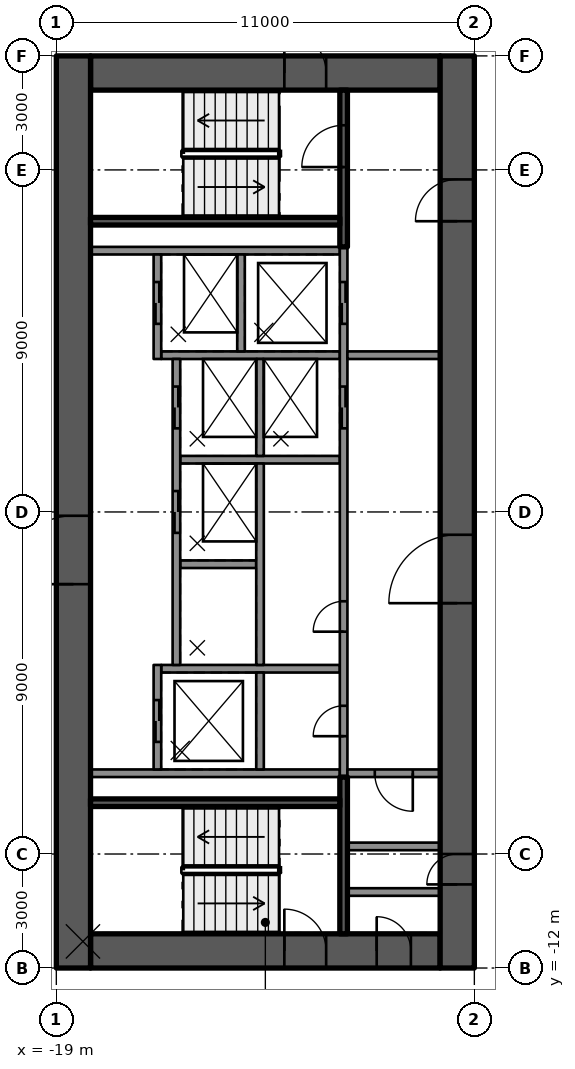
"""IFC4 building model, lengths in metres.
Left out: names, types, materials, properties, quantities, classifications, styles, units other than length and angle.
Written with IfcOpenShell. Run it as: python <this file> out.ifc"""

import sys

from ifc_helpers import new_model, si_unit, direction, frame, frame_2d, origin, place, context, subcontext, project, spatial, rectangle, extrude, element, fill, save


model = new_model("IFC4")
c1 = context("Model", 3, precision=1e-05, world=origin(), true_north=direction((0.0, 1.0)))
c2 = subcontext(c1, "Body", "Model", "MODEL_VIEW")
j1 = project(units=[si_unit("LENGTHUNIT", "METRE"), si_unit("PLANEANGLEUNIT", "RADIAN")], contexts=[c1])
p1 = place(None, origin())
s1 = spatial("IfcSite", under=j1, at=p1, CompositionType="ELEMENT")
p2 = place(p1, origin())
s2 = spatial("IfcBuilding", under=s1, at=p2, CompositionType="ELEMENT")
p3 = place(p2, frame((0.0, 0.0, 192.1)))
s3 = spatial("IfcBuildingStorey", under=s2, at=p3, CompositionType="ELEMENT", Elevation=192.1)
p4 = place(p3, frame((-18.1, 11.55, 0.0), z_axis=(0.0, 0.0, 1.0), x_axis=(1.0, 0.0, 0.0)))
e1 = element("IfcWall", 1, at=p4, inside=s3, PredefinedType="SHEAR", context=c2, shape_type="SweptSolid", body=[
    extrude(rectangle(XDim=9.2, YDim=0.9, at=frame_2d((4.6, 0.0))), origin(), (0.0, 0.0, 1.0), 3.5),
])
p5 = place(p4, frame((5.1, 0.0, 0.0)))
e2 = element("IfcOpeningElement", 2, at=p5, cuts=e1, PredefinedType="OPENING", context=c2, shape_type="SweptSolid", body=[
    extrude(rectangle(XDim=1.1, YDim=2.1, at=frame_2d((0.55, 1.05))), frame((0.0, 0.46, 0.0), z_axis=(0.0, -1.0, 0.0), x_axis=(1.0, 0.0, 0.0)), (0.0, 0.0, 1.0), 0.92),
])
p6 = place(p3, frame((-18.1, -11.55, 0.0), z_axis=(0.0, 0.0, 1.0), x_axis=(1.0, 0.0, 0.0)))
e3 = element("IfcWall", 3, at=p6, inside=s3, PredefinedType="SHEAR", context=c2, shape_type="SweptSolid", body=[
    extrude(rectangle(XDim=9.2, YDim=0.9, at=frame_2d((4.6, 0.0))), origin(), (0.0, 0.0, 1.0), 3.5),
])
p7 = place(p6, frame((5.1, 0.0, 0.0)))
e4 = element("IfcOpeningElement", 4, at=p7, cuts=e3, PredefinedType="OPENING", context=c2, shape_type="SweptSolid", body=[
    extrude(rectangle(XDim=1.1, YDim=2.1, at=frame_2d((0.55, 1.05))), frame((0.0, 0.46, 0.0), z_axis=(0.0, -1.0, 0.0), x_axis=(1.0, 0.0, 0.0)), (0.0, 0.0, 1.0), 0.92),
])
p8 = place(p6, frame((7.53, 0.0, 0.0)))
e5 = element("IfcOpeningElement", 5, at=p8, cuts=e3, PredefinedType="OPENING", context=c2, shape_type="SweptSolid", body=[
    extrude(rectangle(XDim=0.9, YDim=2.1, at=frame_2d((0.45, 1.05))), frame((0.0, 0.46, 0.0), z_axis=(0.0, -1.0, 0.0), x_axis=(1.0, 0.0, 0.0)), (0.0, 0.0, 1.0), 0.92),
])
p9 = place(p3, frame((-18.55, -12.0, 0.0), z_axis=(0.0, 0.0, 1.0), x_axis=(0.0, 1.0, 0.0)))
e6 = element("IfcWall", 6, at=p9, inside=s3, PredefinedType="SHEAR", context=c2, shape_type="SweptSolid", body=[
    extrude(rectangle(XDim=24.0, YDim=0.9, at=frame_2d((12.0, 0.0))), origin(), (0.0, 0.0, 1.0), 3.5),
])
p10 = place(p9, frame((10.1, 0.0, 0.0)))
e7 = element("IfcOpeningElement", 7, at=p10, cuts=e6, PredefinedType="OPENING", context=c2, shape_type="SweptSolid", body=[
    extrude(rectangle(XDim=1.8, YDim=2.1, at=frame_2d((0.9, 1.05))), frame((0.0, 0.46, 0.0), z_axis=(0.0, -1.0, 0.0), x_axis=(1.0, 0.0, 0.0)), (0.0, 0.0, 1.0), 0.92),
])
p11 = place(p3, frame((-8.45, -12.0, 0.0), z_axis=(0.0, 0.0, 1.0), x_axis=(0.0, 1.0, 0.0)))
e8 = element("IfcWall", 8, at=p11, inside=s3, PredefinedType="SHEAR", context=c2, shape_type="SweptSolid", body=[
    extrude(rectangle(XDim=24.0, YDim=0.9, at=frame_2d((12.0, 0.0))), origin(), (0.0, 0.0, 1.0), 3.5),
])
p12 = place(p11, frame((9.6, 0.0, 0.0)))
e9 = element("IfcOpeningElement", 9, at=p12, cuts=e8, PredefinedType="OPENING", context=c2, shape_type="SweptSolid", body=[
    extrude(rectangle(XDim=1.8, YDim=2.1, at=frame_2d((0.9, 1.05))), frame((0.0, 0.46, 0.0), z_axis=(0.0, -1.0, 0.0), x_axis=(1.0, 0.0, 0.0)), (0.0, 0.0, 1.0), 0.92),
])
p13 = place(p11, frame((19.65, 0.0, 0.0)))
e10 = element("IfcOpeningElement", 10, at=p13, cuts=e8, PredefinedType="OPENING", context=c2, shape_type="SweptSolid", body=[
    extrude(rectangle(XDim=1.1, YDim=2.1, at=frame_2d((0.55, 1.05))), frame((0.0, 0.46, 0.0), z_axis=(0.0, -1.0, 0.0), x_axis=(1.0, 0.0, 0.0)), (0.0, 0.0, 1.0), 0.92),
])
p14 = place(p11, frame((2.2, 0.0, 0.0)))
e11 = element("IfcOpeningElement", 11, at=p14, cuts=e8, PredefinedType="OPENING", context=c2, shape_type="SweptSolid", body=[
    extrude(rectangle(XDim=0.8, YDim=2.1, at=frame_2d((0.4, 1.05))), frame((0.0, 0.46, 0.0), z_axis=(0.0, -1.0, 0.0), x_axis=(1.0, 0.0, 0.0)), (0.0, 0.0, 1.0), 0.92),
])
for number, where, z_axis, x_axis in (
    (12, (-11.54, 6.875, 0.0), (0.0, 0.0, 1.0), (-1.0, 0.0, 0.0)),
    (13, (-11.54, -6.875, 0.0), (0.0, 0.0, 1.0), (-1.0, 0.0, 0.0)),
):
    element("IfcWall", number, at=place(p3, frame(where, z_axis=z_axis, x_axis=x_axis)), inside=s3, PredefinedType="SOLIDWALL", context=c2, shape_type="SweptSolid", body=[
        extrude(rectangle(XDim=6.56, YDim=0.2, at=frame_2d((3.28, 0.0))), origin(), (0.0, 0.0, 1.0), 3.08),
    ])
p15 = place(p3, frame((-11.54, -4.125, 0.0), z_axis=(0.0, 0.0, 1.0), x_axis=(-1.0, 0.0, 0.0)))
e14 = element("IfcWall", 14, at=p15, inside=s3, PredefinedType="SOLIDWALL", context=c2, shape_type="SweptSolid", body=[
    extrude(rectangle(XDim=4.7, YDim=0.2, at=frame_2d((2.35, 0.0))), origin(), (0.0, 0.0, 1.0), 3.08),
])
p16 = place(p3, frame((-13.74, -1.375, 0.0), z_axis=(0.0, 0.0, 1.0), x_axis=(-1.0, 0.0, 0.0)))
e15 = element("IfcWall", 15, at=p16, inside=s3, PredefinedType="SOLIDWALL", context=c2, shape_type="SweptSolid", body=[
    extrude(rectangle(XDim=2.0, YDim=0.2, at=frame_2d((1.0, 0.0))), origin(), (0.0, 0.0, 1.0), 3.08),
])
p17 = place(p3, frame((-11.54, 1.375, 0.0), z_axis=(0.0, 0.0, 1.0), x_axis=(-1.0, 0.0, 0.0)))
e16 = element("IfcWall", 16, at=p17, inside=s3, PredefinedType="SOLIDWALL", context=c2, shape_type="SweptSolid", body=[
    extrude(rectangle(XDim=4.2, YDim=0.2, at=frame_2d((2.1, 0.0))), origin(), (0.0, 0.0, 1.0), 3.08),
])
p18 = place(p3, frame((-11.54, 4.125, 0.0), z_axis=(0.0, 0.0, 1.0), x_axis=(-1.0, 0.0, 0.0)))
e17 = element("IfcWall", 17, at=p18, inside=s3, PredefinedType="SOLIDWALL", context=c2, shape_type="SweptSolid", body=[
    extrude(rectangle(XDim=4.7, YDim=0.2, at=frame_2d((2.35, 0.0))), origin(), (0.0, 0.0, 1.0), 3.08),
])
p19 = place(p3, frame((-11.44, -6.975, 0.0), z_axis=(0.0, 0.0, 1.0), x_axis=(0.0, 1.0, 0.0)))
e18 = element("IfcWall", 18, at=p19, inside=s3, PredefinedType="SOLIDWALL", context=c2, shape_type="SweptSolid", body=[
    extrude(rectangle(XDim=13.95, YDim=0.2, at=frame_2d((6.975, 0.0))), origin(), (0.0, 0.0, 1.0), 3.08),
])
p20 = place(p19, frame((9.175, 0.0, 0.0)))
e19 = element("IfcOpeningElement", 19, at=p20, cuts=e18, PredefinedType="OPENING", context=c2, shape_type="SweptSolid", body=[
    extrude(rectangle(XDim=1.1, YDim=2.1, at=frame_2d((0.55, 1.05))), frame((0.0, 0.11, 0.0), z_axis=(0.0, -1.0, 0.0), x_axis=(1.0, 0.0, 0.0)), (0.0, 0.0, 1.0), 0.22),
])
p21 = place(p19, frame((11.925, 0.0, 0.0)))
e20 = element("IfcOpeningElement", 20, at=p21, cuts=e18, PredefinedType="OPENING", context=c2, shape_type="SweptSolid", body=[
    extrude(rectangle(XDim=1.1, YDim=2.1, at=frame_2d((0.55, 1.05))), frame((0.0, 0.11, 0.0), z_axis=(0.0, -1.0, 0.0), x_axis=(1.0, 0.0, 0.0)), (0.0, 0.0, 1.0), 0.22),
])
p22 = place(p19, frame((1.075, 0.0, 0.0)))
e21 = element("IfcOpeningElement", 21, at=p22, cuts=e18, PredefinedType="OPENING", context=c2, shape_type="SweptSolid", body=[
    extrude(rectangle(XDim=0.8, YDim=2.1, at=frame_2d((0.4, 1.05))), frame((0.0, 0.11, 0.0), z_axis=(0.0, -1.0, 0.0), x_axis=(1.0, 0.0, 0.0)), (0.0, 0.0, 1.0), 0.22),
])
p23 = place(p19, frame((3.825, 0.0, 0.0)))
e22 = element("IfcOpeningElement", 22, at=p23, cuts=e18, PredefinedType="OPENING", context=c2, shape_type="SweptSolid", body=[
    extrude(rectangle(XDim=0.8, YDim=2.1, at=frame_2d((0.4, 1.05))), frame((0.0, 0.11, 0.0), z_axis=(0.0, -1.0, 0.0), x_axis=(1.0, 0.0, 0.0)), (0.0, 0.0, 1.0), 0.22),
])
p24 = place(p3, frame((-13.64, -6.775, 0.0), z_axis=(0.0, 0.0, 1.0), x_axis=(0.0, 1.0, 0.0)))
e23 = element("IfcWall", 23, at=p24, inside=s3, PredefinedType="SOLIDWALL", context=c2, shape_type="SweptSolid", body=[
    extrude(rectangle(XDim=2.55, YDim=0.2, at=frame_2d((1.275, 0.0))), origin(), (0.0, 0.0, 1.0), 3.08),
])
p25 = place(p3, frame((-13.64, -4.025, 0.0), z_axis=(0.0, 0.0, 1.0), x_axis=(0.0, 1.0, 0.0)))
e24 = element("IfcWall", 24, at=p25, inside=s3, PredefinedType="SOLIDWALL", context=c2, shape_type="SweptSolid", body=[
    extrude(rectangle(XDim=5.3, YDim=0.2, at=frame_2d((2.65, 0.0))), origin(), (0.0, 0.0, 1.0), 3.08),
])
for number, where, z_axis, x_axis in (
    (25, (-13.64, 1.475, 0.0), (0.0, 0.0, 1.0), (0.0, 1.0, 0.0)),
    (26, (-14.14, 4.225, 0.0), (0.0, 0.0, 1.0), (0.0, 1.0, 0.0)),
):
    element("IfcWall", number, at=place(p3, frame(where, z_axis=z_axis, x_axis=x_axis)), inside=s3, PredefinedType="SOLIDWALL", context=c2, shape_type="SweptSolid", body=[
        extrude(rectangle(XDim=2.55, YDim=0.2, at=frame_2d((1.275, 0.0))), origin(), (0.0, 0.0, 1.0), 3.08),
    ])
p26 = place(p3, frame((-16.34, -6.775, 0.0), z_axis=(0.0, 0.0, 1.0), x_axis=(0.0, 1.0, 0.0)))
e27 = element("IfcWall", 27, at=p26, inside=s3, PredefinedType="SOLIDWALL", context=c2, shape_type="SweptSolid", body=[
    extrude(rectangle(XDim=2.75, YDim=0.2, at=frame_2d((1.375, 0.0))), origin(), (0.0, 0.0, 1.0), 3.08),
])
p27 = place(p26, frame((0.725, 0.0, 0.0)))
e28 = element("IfcOpeningElement", 28, at=p27, cuts=e27, PredefinedType="OPENING", context=c2, shape_type="SweptSolid", body=[
    extrude(rectangle(XDim=1.1, YDim=2.1, at=frame_2d((0.55, 1.05))), frame((0.0, 0.11, 0.0), z_axis=(0.0, -1.0, 0.0), x_axis=(1.0, 0.0, 0.0)), (0.0, 0.0, 1.0), 0.22),
])
p28 = place(p3, frame((-15.84, -4.025, 0.0), z_axis=(0.0, 0.0, 1.0), x_axis=(0.0, 1.0, 0.0)))
e29 = element("IfcWall", 29, at=p28, inside=s3, PredefinedType="SOLIDWALL", context=c2, shape_type="SweptSolid", body=[
    extrude(rectangle(XDim=8.05, YDim=0.2, at=frame_2d((4.025, 0.0))), origin(), (0.0, 0.0, 1.0), 3.08),
])
p29 = place(p28, frame((3.475, 0.0, 0.0)))
e30 = element("IfcOpeningElement", 30, at=p29, cuts=e29, PredefinedType="OPENING", context=c2, shape_type="SweptSolid", body=[
    extrude(rectangle(XDim=1.1, YDim=2.1, at=frame_2d((0.55, 1.05))), frame((0.0, 0.11, 0.0), z_axis=(0.0, -1.0, 0.0), x_axis=(1.0, 0.0, 0.0)), (0.0, 0.0, 1.0), 0.22),
])
p30 = place(p28, frame((6.225, 0.0, 0.0)))
e31 = element("IfcOpeningElement", 31, at=p30, cuts=e29, PredefinedType="OPENING", context=c2, shape_type="SweptSolid", body=[
    extrude(rectangle(XDim=1.1, YDim=2.1, at=frame_2d((0.55, 1.05))), frame((0.0, 0.11, 0.0), z_axis=(0.0, -1.0, 0.0), x_axis=(1.0, 0.0, 0.0)), (0.0, 0.0, 1.0), 0.22),
])
p31 = place(p3, frame((-16.34, 4.025, 0.0), z_axis=(0.0, 0.0, 1.0), x_axis=(0.0, 1.0, 0.0)))
e32 = element("IfcWall", 32, at=p31, inside=s3, PredefinedType="SOLIDWALL", context=c2, shape_type="SweptSolid", body=[
    extrude(rectangle(XDim=2.75, YDim=0.2, at=frame_2d((1.375, 0.0))), origin(), (0.0, 0.0, 1.0), 3.08),
])
p32 = place(p31, frame((0.925, 0.0, 0.0)))
e33 = element("IfcOpeningElement", 33, at=p32, cuts=e32, PredefinedType="OPENING", context=c2, shape_type="SweptSolid", body=[
    extrude(rectangle(XDim=1.1, YDim=2.1, at=frame_2d((0.55, 1.05))), frame((0.0, 0.11, 0.0), z_axis=(0.0, -1.0, 0.0), x_axis=(1.0, 0.0, 0.0)), (0.0, 0.0, 1.0), 0.22),
])
p33 = place(p3, frame((-11.44, 6.975, 0.0), z_axis=(0.0, 0.0, 1.0), x_axis=(0.0, 1.0, 0.0)))
e34 = element("IfcWall", 34, at=p33, inside=s3, PredefinedType="SOLIDWALL", context=c2, shape_type="SweptSolid", body=[
    extrude(rectangle(XDim=4.125, YDim=0.2, at=frame_2d((2.062, 0.0))), origin(), (0.0, 0.0, 1.0), 3.08),
])
p34 = place(p33, frame((2.1, 0.0, 0.0)))
e35 = element("IfcOpeningElement", 35, at=p34, cuts=e34, PredefinedType="OPENING", context=c2, shape_type="SweptSolid", body=[
    extrude(rectangle(XDim=1.1, YDim=2.1, at=frame_2d((0.55, 1.05))), frame((0.0, 0.11, 0.0), z_axis=(0.0, -1.0, 0.0), x_axis=(1.0, 0.0, 0.0)), (0.0, 0.0, 1.0), 0.22),
])
p35 = place(p3, frame((-11.54, 7.65, 0.0), z_axis=(0.0, 0.0, 1.0), x_axis=(-1.0, 0.0, 0.0)))
e36 = element("IfcWall", 36, at=p35, inside=s3, PredefinedType="SOLIDWALL", context=c2, shape_type="SweptSolid", body=[
    extrude(rectangle(XDim=6.56, YDim=0.2, at=frame_2d((3.28, 0.0))), origin(), (0.0, 0.0, 1.0), 3.08),
])
p36 = place(p3, frame((-11.44, -11.1, 0.0), z_axis=(0.0, 0.0, 1.0), x_axis=(0.0, 1.0, 0.0)))
e37 = element("IfcWall", 37, at=p36, inside=s3, PredefinedType="SOLIDWALL", context=c2, shape_type="SweptSolid", body=[
    extrude(rectangle(XDim=4.125, YDim=0.2, at=frame_2d((2.062, 0.0))), origin(), (0.0, 0.0, 1.0), 3.08),
])
p37 = place(p3, frame((-11.54, -7.65, 0.0), z_axis=(0.0, 0.0, 1.0), x_axis=(-1.0, 0.0, 0.0)))
e38 = element("IfcWall", 38, at=p37, inside=s3, PredefinedType="SOLIDWALL", context=c2, shape_type="SweptSolid", body=[
    extrude(rectangle(XDim=6.56, YDim=0.2, at=frame_2d((3.28, 0.0))), origin(), (0.0, 0.0, 1.0), 3.08),
])
p38 = place(p3, frame((-8.9, 4.125, 0.0), z_axis=(0.0, 0.0, 1.0), x_axis=(-1.0, 0.0, 0.0)))
e39 = element("IfcWall", 39, at=p38, inside=s3, PredefinedType="PARTITIONING", context=c2, shape_type="SweptSolid", body=[
    extrude(rectangle(XDim=2.44, YDim=0.2, at=frame_2d((1.22, 0.0))), origin(), (0.0, 0.0, 1.0), 3.08),
])
p39 = place(p3, frame((-8.9, -6.875, 0.0), z_axis=(0.0, 0.0, 1.0), x_axis=(-1.0, 0.0, 0.0)))
e40 = element("IfcWall", 40, at=p39, inside=s3, PredefinedType="PARTITIONING", context=c2, shape_type="SweptSolid", body=[
    extrude(rectangle(XDim=2.44, YDim=0.2, at=frame_2d((1.22, 0.0))), origin(), (0.0, 0.0, 1.0), 3.08),
])
p40 = place(p39, frame((0.72, 0.0, 0.0)))
e41 = element("IfcOpeningElement", 41, at=p40, cuts=e40, PredefinedType="OPENING", context=c2, shape_type="SweptSolid", body=[
    extrude(rectangle(XDim=1.0, YDim=2.1, at=frame_2d((0.5, 1.05))), frame((0.0, 0.11, 0.0), z_axis=(0.0, -1.0, 0.0), x_axis=(1.0, 0.0, 0.0)), (0.0, 0.0, 1.0), 0.22),
])
for number, where, z_axis, x_axis in (
    (42, (-8.9, -10.0, 0.0), (0.0, 0.0, 1.0), (-1.0, 0.0, 0.0)),
    (43, (-8.9, -8.8, 0.0), (0.0, 0.0, 1.0), (-1.0, 0.0, 0.0)),
):
    element("IfcWall", number, at=place(p3, frame(where, z_axis=z_axis, x_axis=x_axis)), inside=s3, PredefinedType="PARTITIONING", context=c2, shape_type="SweptSolid", body=[
        extrude(rectangle(XDim=2.44, YDim=0.2, at=frame_2d((1.22, 0.0))), origin(), (0.0, 0.0, 1.0), 3.08),
    ])
p41 = place(p27, origin())
e44 = element("IfcDoor", 44, at=p41, inside=s3, OperationType="DOUBLE_DOOR_SLIDING", PredefinedType="DOOR", context=c2, shape_type="SweptSolid", body=[
    extrude(rectangle(XDim=1.1, YDim=2.1, at=frame_2d((0.55, 1.05))), frame((0.0, 0.025, 0.0), z_axis=(0.0, -1.0, 0.0), x_axis=(1.0, 0.0, 0.0)), (0.0, 0.0, 1.0), 0.05),
])
fill(e28, e44)
p42 = place(p29, origin())
e45 = element("IfcDoor", 45, at=p42, inside=s3, OperationType="DOUBLE_DOOR_SLIDING", PredefinedType="DOOR", context=c2, shape_type="SweptSolid", body=[
    extrude(rectangle(XDim=1.1, YDim=2.1, at=frame_2d((0.55, 1.05))), frame((0.0, 0.025, 0.0), z_axis=(0.0, -1.0, 0.0), x_axis=(1.0, 0.0, 0.0)), (0.0, 0.0, 1.0), 0.05),
])
fill(e30, e45)
p43 = place(p20, origin())
e46 = element("IfcDoor", 46, at=p43, inside=s3, OperationType="DOUBLE_DOOR_SLIDING", PredefinedType="DOOR", context=c2, shape_type="SweptSolid", body=[
    extrude(rectangle(XDim=1.1, YDim=2.1, at=frame_2d((0.55, 1.05))), frame((0.0, 0.025, 0.0), z_axis=(0.0, -1.0, 0.0), x_axis=(1.0, 0.0, 0.0)), (0.0, 0.0, 1.0), 0.05),
])
fill(e19, e46)
p44 = place(p30, origin())
e47 = element("IfcDoor", 47, at=p44, inside=s3, OperationType="DOUBLE_DOOR_SLIDING", PredefinedType="DOOR", context=c2, shape_type="SweptSolid", body=[
    extrude(rectangle(XDim=1.1, YDim=2.1, at=frame_2d((0.55, 1.05))), frame((0.0, 0.025, 0.0), z_axis=(0.0, -1.0, 0.0), x_axis=(1.0, 0.0, 0.0)), (0.0, 0.0, 1.0), 0.05),
])
fill(e31, e47)
p45 = place(p21, origin())
e48 = element("IfcDoor", 48, at=p45, inside=s3, OperationType="DOUBLE_DOOR_SLIDING", PredefinedType="DOOR", context=c2, shape_type="SweptSolid", body=[
    extrude(rectangle(XDim=1.1, YDim=2.1, at=frame_2d((0.55, 1.05))), frame((0.0, 0.025, 0.0), z_axis=(0.0, -1.0, 0.0), x_axis=(1.0, 0.0, 0.0)), (0.0, 0.0, 1.0), 0.05),
])
fill(e20, e48)
p46 = place(p32, origin())
e49 = element("IfcDoor", 49, at=p46, inside=s3, OperationType="DOUBLE_DOOR_SLIDING", PredefinedType="DOOR", context=c2, shape_type="SweptSolid", body=[
    extrude(rectangle(XDim=1.1, YDim=2.1, at=frame_2d((0.55, 1.05))), frame((0.0, 0.025, 0.0), z_axis=(0.0, -1.0, 0.0), x_axis=(1.0, 0.0, 0.0)), (0.0, 0.0, 1.0), 0.05),
])
fill(e33, e49)
p47 = place(p22, origin())
e50 = element("IfcDoor", 50, at=p47, inside=s3, OperationType="SINGLE_SWING_LEFT", PredefinedType="DOOR", context=c2, shape_type="SweptSolid", body=[
    extrude(rectangle(XDim=0.8, YDim=2.1, at=frame_2d((0.4, 1.05))), frame((0.0, 0.025, 0.0), z_axis=(0.0, -1.0, 0.0), x_axis=(1.0, 0.0, 0.0)), (0.0, 0.0, 1.0), 0.05),
])
fill(e21, e50)
p48 = place(p23, origin())
e51 = element("IfcDoor", 51, at=p48, inside=s3, OperationType="SINGLE_SWING_LEFT", PredefinedType="DOOR", context=c2, shape_type="SweptSolid", body=[
    extrude(rectangle(XDim=0.8, YDim=2.1, at=frame_2d((0.4, 1.05))), frame((0.0, 0.025, 0.0), z_axis=(0.0, -1.0, 0.0), x_axis=(1.0, 0.0, 0.0)), (0.0, 0.0, 1.0), 0.05),
])
fill(e22, e51)
p49 = place(p12, origin())
e52 = element("IfcDoor", 52, at=p49, inside=s3, OperationType="SINGLE_SWING_LEFT", PredefinedType="DOOR", context=c2, shape_type="SweptSolid", body=[
    extrude(rectangle(XDim=1.8, YDim=2.1, at=frame_2d((0.9, 1.05))), frame((0.0, 0.025, 0.0), z_axis=(0.0, -1.0, 0.0), x_axis=(1.0, 0.0, 0.0)), (0.0, 0.0, 1.0), 0.05),
])
fill(e9, e52)
p50 = place(p10, origin())
e53 = element("IfcDoor", 53, at=p50, inside=s3, OperationType="SINGLE_SWING_LEFT", PredefinedType="DOOR", context=c2, shape_type="SweptSolid", body=[
    extrude(rectangle(XDim=1.8, YDim=2.1, at=frame_2d((0.9, 1.05))), frame((0.0, 0.025, 0.0), z_axis=(0.0, -1.0, 0.0), x_axis=(1.0, 0.0, 0.0)), (0.0, 0.0, 1.0), 0.05),
])
fill(e7, e53)
p51 = place(p13, origin())
e54 = element("IfcDoor", 54, at=p51, inside=s3, OperationType="SINGLE_SWING_RIGHT", PredefinedType="DOOR", context=c2, shape_type="SweptSolid", body=[
    extrude(rectangle(XDim=1.1, YDim=2.1, at=frame_2d((0.55, 1.05))), frame((0.0, 0.025, 0.0), z_axis=(0.0, -1.0, 0.0), x_axis=(1.0, 0.0, 0.0)), (0.0, 0.0, 1.0), 0.05),
])
fill(e10, e54)
p52 = place(p5, origin())
e55 = element("IfcDoor", 55, at=p52, inside=s3, OperationType="SINGLE_SWING_RIGHT", PredefinedType="DOOR", context=c2, shape_type="SweptSolid", body=[
    extrude(rectangle(XDim=1.1, YDim=2.1, at=frame_2d((0.55, 1.05))), frame((0.0, 0.025, 0.0), z_axis=(0.0, -1.0, 0.0), x_axis=(1.0, 0.0, 0.0)), (0.0, 0.0, 1.0), 0.05),
])
fill(e2, e55)
p53 = place(p7, origin())
e56 = element("IfcDoor", 56, at=p53, inside=s3, OperationType="SINGLE_SWING_RIGHT", PredefinedType="DOOR", context=c2, shape_type="SweptSolid", body=[
    extrude(rectangle(XDim=1.1, YDim=2.1, at=frame_2d((0.55, 1.05))), frame((0.0, 0.025, 0.0), z_axis=(0.0, -1.0, 0.0), x_axis=(1.0, 0.0, 0.0)), (0.0, 0.0, 1.0), 0.05),
])
fill(e4, e56)
p54 = place(p34, origin())
e57 = element("IfcDoor", 57, at=p54, inside=s3, OperationType="SINGLE_SWING_RIGHT", PredefinedType="DOOR", context=c2, shape_type="SweptSolid", body=[
    extrude(rectangle(XDim=1.1, YDim=2.1, at=frame_2d((0.55, 1.05))), frame((0.0, 0.025, 0.0), z_axis=(0.0, -1.0, 0.0), x_axis=(1.0, 0.0, 0.0)), (0.0, 0.0, 1.0), 0.05),
])
fill(e35, e57)
p55 = place(p8, origin())
e58 = element("IfcDoor", 58, at=p55, inside=s3, OperationType="SINGLE_SWING_RIGHT", PredefinedType="DOOR", context=c2, shape_type="SweptSolid", body=[
    extrude(rectangle(XDim=0.9, YDim=2.1, at=frame_2d((0.45, 1.05))), frame((0.0, 0.025, 0.0), z_axis=(0.0, -1.0, 0.0), x_axis=(1.0, 0.0, 0.0)), (0.0, 0.0, 1.0), 0.05),
])
fill(e5, e58)
p56 = place(p14, origin())
e59 = element("IfcDoor", 59, at=p56, inside=s3, OperationType="SINGLE_SWING_LEFT", PredefinedType="DOOR", context=c2, shape_type="SweptSolid", body=[
    extrude(rectangle(XDim=0.8, YDim=2.1, at=frame_2d((0.4, 1.05))), frame((0.0, 0.025, 0.0), z_axis=(0.0, -1.0, 0.0), x_axis=(1.0, 0.0, 0.0)), (0.0, 0.0, 1.0), 0.05),
])
fill(e11, e59)
p57 = place(p40, origin())
e60 = element("IfcDoor", 60, at=p57, inside=s3, OperationType="SINGLE_SWING_RIGHT", PredefinedType="DOOR", context=c2, shape_type="SweptSolid", body=[
    extrude(rectangle(XDim=1.0, YDim=2.1, at=frame_2d((0.5, 1.05))), frame((0.0, 0.025, 0.0), z_axis=(0.0, -1.0, 0.0), x_axis=(1.0, 0.0, 0.0)), (0.0, 0.0, 1.0), 0.05),
])
fill(e41, e60)
save(model, sys.argv[1])
